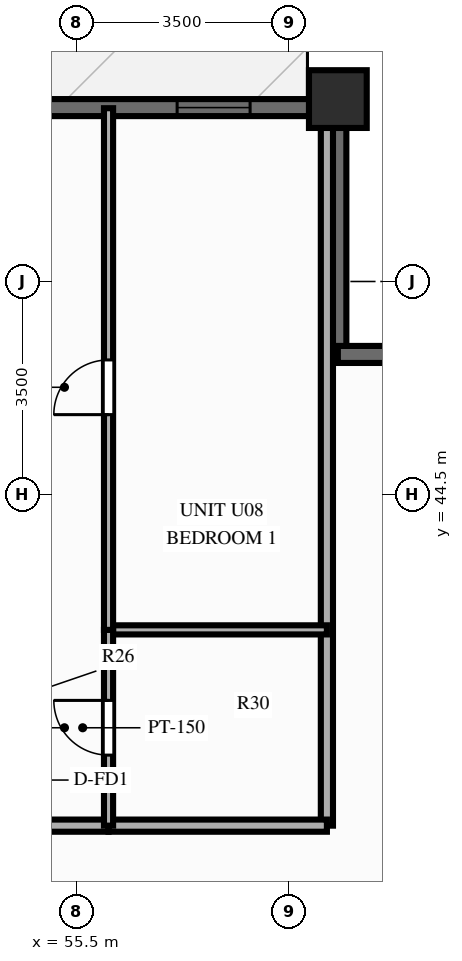
"""IFC4 building model, lengths in metres.
Left out: names, types, materials, properties, quantities, classifications, styles, units other than length and angle.
Written with IfcOpenShell. Run it as: python <this file> out.ifc"""

import sys

from ifc_helpers import new_model, si_unit, direction, frame, frame_2d, origin, origin_2d, place, context, subcontext, project, spatial, rectangle, extrude, source, transform, mapped, element, fill, save


model = new_model("IFC4")
c1 = context("Model", 3, precision=1e-05, world=origin(), true_north=direction((0.0, 1.0)))
c2 = subcontext(c1, "Body", "Model", "MODEL_VIEW")
j1 = project(units=[si_unit("LENGTHUNIT", "METRE"), si_unit("PLANEANGLEUNIT", "RADIAN")], contexts=[c1])
p1 = place(None, origin())
s1 = spatial("IfcSite", under=j1, at=p1, CompositionType="ELEMENT")
p2 = place(p1, origin())
s2 = spatial("IfcBuilding", under=s1, at=p2, CompositionType="ELEMENT")
p3 = place(p2, frame((0.0, 0.0, 86.85)))
s3 = spatial("IfcBuildingStorey", under=s2, at=p3, CompositionType="ELEMENT", Elevation=86.85)
m1 = source(origin(), c2, "Body", "SweptSolid", [
    extrude(rectangle(XDim=0.95, YDim=0.95, at=origin_2d()), origin(), (0.0, 0.0, 1.0), 3.0),
])
p4 = place(p3, frame((59.8, 51.0, 0.0), z_axis=(0.0, 0.0, 1.0), x_axis=(1.0, 0.0, 0.0)))
e1 = element("IfcColumn", 1, at=p4, inside=s3, PredefinedType="COLUMN", context=c2, shape_type="MappedRepresentation", body=[
    mapped(m1, transform((0.0, 0.0, 0.0), scale=1.0)),
])
p5 = place(p3, frame((16.2, 50.86, 0.0), z_axis=(0.0, 0.0, 1.0), x_axis=(1.0, 0.0, 0.0)))
e2 = element("IfcWall", 2, at=p5, inside=s3, PredefinedType="SOLIDWALL", context=c2, shape_type="SweptSolid", body=[
    extrude(rectangle(XDim=43.6, YDim=0.28, at=frame_2d((21.8, 0.0))), origin(), (0.0, 0.0, 1.0), 2.28),
])
p6 = place(p5, frame((0.722, 0.0, 0.25)))
e3 = element("IfcOpeningElement", 3, at=p6, cuts=e2, PredefinedType="OPENING", context=c2, shape_type="SweptSolid", body=[
    extrude(rectangle(XDim=1.2, YDim=1.5, at=frame_2d((0.6, 0.75))), frame((0.0, 0.152, 0.0), z_axis=(0.0, -1.0, 0.0), x_axis=(1.0, 0.0, 0.0)), (0.0, 0.0, 1.0), 0.304),
])
p7 = place(p5, frame((3.172, 0.0, 0.25)))
e4 = element("IfcOpeningElement", 4, at=p7, cuts=e2, PredefinedType="OPENING", context=c2, shape_type="SweptSolid", body=[
    extrude(rectangle(XDim=1.2, YDim=1.5, at=frame_2d((0.6, 0.75))), frame((0.0, 0.152, 0.0), z_axis=(0.0, -1.0, 0.0), x_axis=(1.0, 0.0, 0.0)), (0.0, 0.0, 1.0), 0.304),
])
p8 = place(p5, frame((6.944, 0.0, 0.25)))
e5 = element("IfcOpeningElement", 5, at=p8, cuts=e2, PredefinedType="OPENING", context=c2, shape_type="SweptSolid", body=[
    extrude(rectangle(XDim=1.2, YDim=1.5, at=frame_2d((0.6, 0.75))), frame((0.0, 0.152, 0.0), z_axis=(0.0, -1.0, 0.0), x_axis=(1.0, 0.0, 0.0)), (0.0, 0.0, 1.0), 0.304),
])
p9 = place(p5, frame((11.049, 0.0, 0.25)))
e6 = element("IfcOpeningElement", 6, at=p9, cuts=e2, PredefinedType="OPENING", context=c2, shape_type="SweptSolid", body=[
    extrude(rectangle(XDim=1.2, YDim=1.5, at=frame_2d((0.6, 0.75))), frame((0.0, 0.152, 0.0), z_axis=(0.0, -1.0, 0.0), x_axis=(1.0, 0.0, 0.0)), (0.0, 0.0, 1.0), 0.304),
])
p10 = place(p5, frame((13.73, 0.0, 0.25)))
e7 = element("IfcOpeningElement", 7, at=p10, cuts=e2, PredefinedType="OPENING", context=c2, shape_type="SweptSolid", body=[
    extrude(rectangle(XDim=0.95, YDim=1.5, at=frame_2d((0.475, 0.75))), frame((0.0, 0.152, 0.0), z_axis=(0.0, -1.0, 0.0), x_axis=(1.0, 0.0, 0.0)), (0.0, 0.0, 1.0), 0.304),
])
p11 = place(p5, frame((18.089, 0.0, 0.0)))
e8 = element("IfcOpeningElement", 8, at=p11, cuts=e2, PredefinedType="OPENING", context=c2, shape_type="SweptSolid", body=[
    extrude(rectangle(XDim=1.1, YDim=2.15, at=frame_2d((0.55, 1.075))), frame((0.0, 0.152, 0.0), z_axis=(0.0, -1.0, 0.0), x_axis=(1.0, 0.0, 0.0)), (0.0, 0.0, 1.0), 0.304),
])
p12 = place(p5, frame((22.144, 0.0, 0.25)))
e9 = element("IfcOpeningElement", 9, at=p12, cuts=e2, PredefinedType="OPENING", context=c2, shape_type="SweptSolid", body=[
    extrude(rectangle(XDim=1.2, YDim=1.5, at=frame_2d((0.6, 0.75))), frame((0.0, 0.152, 0.0), z_axis=(0.0, -1.0, 0.0), x_axis=(1.0, 0.0, 0.0)), (0.0, 0.0, 1.0), 0.304),
])
p13 = place(p5, frame((25.242, 0.0, 0.25)))
e10 = element("IfcOpeningElement", 10, at=p13, cuts=e2, PredefinedType="OPENING", context=c2, shape_type="SweptSolid", body=[
    extrude(rectangle(XDim=1.2, YDim=1.5, at=frame_2d((0.6, 0.75))), frame((0.0, 0.152, 0.0), z_axis=(0.0, -1.0, 0.0), x_axis=(1.0, 0.0, 0.0)), (0.0, 0.0, 1.0), 0.304),
])
p14 = place(p5, frame((29.021, 0.0, 0.25)))
e11 = element("IfcOpeningElement", 11, at=p14, cuts=e2, PredefinedType="OPENING", context=c2, shape_type="SweptSolid", body=[
    extrude(rectangle(XDim=0.95, YDim=1.5, at=frame_2d((0.475, 0.75))), frame((0.0, 0.152, 0.0), z_axis=(0.0, -1.0, 0.0), x_axis=(1.0, 0.0, 0.0)), (0.0, 0.0, 1.0), 0.304),
])
p15 = place(p5, frame((31.574, 0.0, 0.25)))
e12 = element("IfcOpeningElement", 12, at=p15, cuts=e2, PredefinedType="OPENING", context=c2, shape_type="SweptSolid", body=[
    extrude(rectangle(XDim=1.2, YDim=1.5, at=frame_2d((0.6, 0.75))), frame((0.0, 0.152, 0.0), z_axis=(0.0, -1.0, 0.0), x_axis=(1.0, 0.0, 0.0)), (0.0, 0.0, 1.0), 0.304),
])
p16 = place(p5, frame((34.692, 0.0, 0.25)))
e13 = element("IfcOpeningElement", 13, at=p16, cuts=e2, PredefinedType="OPENING", context=c2, shape_type="SweptSolid", body=[
    extrude(rectangle(XDim=1.2, YDim=1.5, at=frame_2d((0.6, 0.75))), frame((0.0, 0.152, 0.0), z_axis=(0.0, -1.0, 0.0), x_axis=(1.0, 0.0, 0.0)), (0.0, 0.0, 1.0), 0.304),
])
p17 = place(p5, frame((37.622, 0.0, 0.25)))
e14 = element("IfcOpeningElement", 14, at=p17, cuts=e2, PredefinedType="OPENING", context=c2, shape_type="SweptSolid", body=[
    extrude(rectangle(XDim=1.2, YDim=1.5, at=frame_2d((0.6, 0.75))), frame((0.0, 0.152, 0.0), z_axis=(0.0, -1.0, 0.0), x_axis=(1.0, 0.0, 0.0)), (0.0, 0.0, 1.0), 0.304),
])
p18 = place(p5, frame((40.957, 0.0, 0.25)))
e15 = element("IfcOpeningElement", 15, at=p18, cuts=e2, PredefinedType="OPENING", context=c2, shape_type="SweptSolid", body=[
    extrude(rectangle(XDim=1.2, YDim=1.5, at=frame_2d((0.6, 0.75))), frame((0.0, 0.152, 0.0), z_axis=(0.0, -1.0, 0.0), x_axis=(1.0, 0.0, 0.0)), (0.0, 0.0, 1.0), 0.304),
])
for number, where, z_axis, x_axis in (
    (16, (59.8, 46.8, 0.0), (0.0, 0.0, 1.0), (0.0, 1.0, 0.0)),
    (17, (59.8, 46.8, 0.0), (0.0, 0.0, 1.0), (1.0, 0.0, 0.0)),
):
    element("IfcWall", number, at=place(p3, frame(where, z_axis=z_axis, x_axis=x_axis)), inside=s3, PredefinedType="SOLIDWALL", context=c2, shape_type="SweptSolid", body=[
        extrude(rectangle(XDim=4.12, YDim=0.28, at=frame_2d((2.06, 0.0))), origin(), (0.0, 0.0, 1.0), 2.28),
    ])
p19 = place(p3, frame((59.62, 39.05, 0.0), z_axis=(0.0, 0.0, 1.0), x_axis=(0.0, 1.0, 0.0)))
e18 = element("IfcWall", 18, at=p19, inside=s3, PredefinedType="PARTITIONING", context=c2, shape_type="SweptSolid", body=[
    extrude(rectangle(XDim=11.8, YDim=0.2, at=frame_2d((5.9, 0.0))), origin(), (0.0, 0.0, 1.0), 2.79),
])
p20 = place(p3, frame((52.815, 39.05, 0.0), z_axis=(0.0, 0.0, 1.0), x_axis=(1.0, 0.0, 0.0)))
e19 = element("IfcWall", 19, at=p20, inside=s3, PredefinedType="PARTITIONING", context=c2, shape_type="SweptSolid", body=[
    extrude(rectangle(XDim=3.213, YDim=0.2, at=frame_2d((1.607, 0.0))), origin(), (0.0, 0.0, 1.0), 2.79),
])
p21 = place(p20, frame((1.107, 0.0, 0.0)))
e20 = element("IfcOpeningElement", 20, at=p21, cuts=e19, PredefinedType="OPENING", context=c2, shape_type="SweptSolid", body=[
    extrude(rectangle(XDim=1.0, YDim=2.15, at=frame_2d((0.5, 1.075))), frame((0.0, 0.112, 0.0), z_axis=(0.0, -1.0, 0.0), x_axis=(1.0, 0.0, 0.0)), (0.0, 0.0, 1.0), 0.224),
])
p22 = place(p3, frame((56.029, 39.05, 0.0), z_axis=(0.0, 0.0, 1.0), x_axis=(1.0, 0.0, 0.0)))
e21 = element("IfcWall", 21, at=p22, inside=s3, PredefinedType="PARTITIONING", context=c2, shape_type="SweptSolid", body=[
    extrude(rectangle(XDim=3.591, YDim=0.2, at=frame_2d((1.796, 0.0))), origin(), (0.0, 0.0, 1.0), 2.79),
])
p23 = place(p3, frame((56.029, 42.27, 0.0), z_axis=(0.0, 0.0, 1.0), x_axis=(1.0, 0.0, 0.0)))
e22 = element("IfcWall", 22, at=p23, inside=s3, PredefinedType="PARTITIONING", context=c2, shape_type="SweptSolid", body=[
    extrude(rectangle(XDim=3.591, YDim=0.15, at=frame_2d((1.796, 0.0))), origin(), (0.0, 0.0, 1.0), 2.79),
])
p24 = place(p3, frame((56.029, 39.05, 0.0), z_axis=(0.0, 0.0, 1.0), x_axis=(0.0, 1.0, 0.0)))
e23 = element("IfcWall", 23, at=p24, inside=s3, PredefinedType="PARTITIONING", context=c2, shape_type="SweptSolid", body=[
    extrude(rectangle(XDim=3.22, YDim=0.15, at=frame_2d((1.61, 0.0))), origin(), (0.0, 0.0, 1.0), 2.79),
])
p25 = place(p24, frame((1.16, 0.0, 0.0)))
e24 = element("IfcOpeningElement", 24, at=p25, cuts=e23, PredefinedType="OPENING", context=c2, shape_type="SweptSolid", body=[
    extrude(rectangle(XDim=0.9, YDim=2.1, at=frame_2d((0.45, 1.05))), frame((0.0, 0.087, 0.0), z_axis=(0.0, -1.0, 0.0), x_axis=(1.0, 0.0, 0.0)), (0.0, 0.0, 1.0), 0.174),
])
p26 = place(p3, frame((56.029, 42.27, 0.0), z_axis=(0.0, 0.0, 1.0), x_axis=(0.0, 1.0, 0.0)))
e25 = element("IfcWall", 25, at=p26, inside=s3, PredefinedType="PARTITIONING", context=c2, shape_type="SweptSolid", body=[
    extrude(rectangle(XDim=8.58, YDim=0.15, at=frame_2d((4.29, 0.0))), origin(), (0.0, 0.0, 1.0), 2.79),
])
p27 = place(p26, frame((3.54, 0.0, 0.0)))
e26 = element("IfcOpeningElement", 26, at=p27, cuts=e25, PredefinedType="OPENING", context=c2, shape_type="SweptSolid", body=[
    extrude(rectangle(XDim=0.9, YDim=2.1, at=frame_2d((0.45, 1.05))), frame((0.0, 0.087, 0.0), z_axis=(0.0, -1.0, 0.0), x_axis=(1.0, 0.0, 0.0)), (0.0, 0.0, 1.0), 0.174),
])
m2 = source(origin(), c2, "Body", "SweptSolid", [
    extrude(rectangle(XDim=1.2, YDim=1.5, at=frame_2d((0.6, 0.75))), frame((0.0, 0.03, 0.0), z_axis=(0.0, -1.0, 0.0), x_axis=(1.0, 0.0, 0.0)), (0.0, 0.0, 1.0), 0.06),
])
p28 = place(p18, origin())
e27 = element("IfcWindow", 27, at=p28, inside=s3, PartitioningType="SINGLE_PANEL", PredefinedType="WINDOW", context=c2, shape_type="MappedRepresentation", body=[
    mapped(m2, transform((0.0, 0.0, 0.0), scale=1.0)),
])
fill(e15, e27)
m3 = source(origin(), c2, "Body", "SweptSolid", [
    extrude(rectangle(XDim=0.9, YDim=2.1, at=frame_2d((0.45, 1.05))), frame((0.0, 0.025, 0.0), z_axis=(0.0, -1.0, 0.0), x_axis=(1.0, 0.0, 0.0)), (0.0, 0.0, 1.0), 0.05),
])
p29 = place(p25, origin())
e28 = element("IfcDoor", 28, at=p29, inside=s3, OperationType="SINGLE_SWING_RIGHT", PredefinedType="DOOR", context=c2, shape_type="MappedRepresentation", body=[
    mapped(m3, transform((0.0, 0.0, 0.0), scale=1.0)),
])
fill(e24, e28)
p30 = place(p27, origin())
e29 = element("IfcDoor", 29, at=p30, inside=s3, OperationType="SINGLE_SWING_LEFT", PredefinedType="DOOR", context=c2, shape_type="MappedRepresentation", body=[
    mapped(m3, transform((0.0, 0.0, 0.0), scale=1.0)),
])
fill(e26, e29)
save(model, sys.argv[1])
